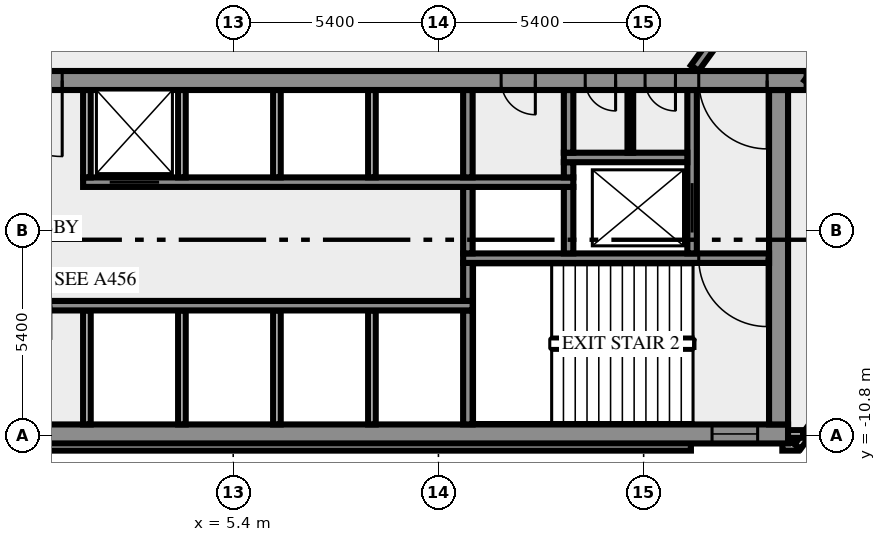
"""IFC4 building model, lengths in metres.
Left out: names, types, materials, properties, quantities, classifications, styles, units other than length and angle.
Written with IfcOpenShell. Run it as: python <this file> out.ifc"""

import sys

from ifc_helpers import new_model, si_unit, direction, frame, frame_2d, origin, place, context, subcontext, project, spatial, rectangle, extrude, element, fill, save


model = new_model("IFC4")
c1 = context("Model", 3, precision=1e-05, world=origin(), true_north=direction((0.0, 1.0)))
c2 = subcontext(c1, "Body", "Model", "MODEL_VIEW")
j1 = project(units=[si_unit("LENGTHUNIT", "METRE"), si_unit("PLANEANGLEUNIT", "RADIAN")], contexts=[c1])
p1 = place(None, origin())
s1 = spatial("IfcSite", under=j1, at=p1, CompositionType="ELEMENT")
p2 = place(p1, origin())
s2 = spatial("IfcBuilding", under=s1, at=p2, CompositionType="ELEMENT")
p3 = place(p2, frame((0.0, 0.0, 51.0)))
s3 = spatial("IfcBuildingStorey", under=s2, at=p3, CompositionType="ELEMENT", Elevation=51.0)
p4 = place(p3, frame((-17.444, -11.088, 0.0), z_axis=(0.0, 0.0, 1.0), x_axis=(1.0, 0.0, 0.0)))
e1 = element("IfcWall", 1, at=p4, inside=s3, PredefinedType="SOLIDWALL", context=c2, shape_type="SweptSolid", body=[
    extrude(rectangle(XDim=34.888, YDim=0.2, at=frame_2d((17.444, 0.0))), origin(), (0.0, 0.0, 1.0), 3.65),
])
p5 = place(p3, frame((19.85, -11.088, 0.0), z_axis=(0.0, 0.0, 1.0), x_axis=(1.0, 0.0, 0.0)))
e2 = element("IfcWall", 2, at=p5, inside=s3, PredefinedType="SOLIDWALL", context=c2, shape_type="SweptSolid", body=[
    extrude(rectangle(XDim=0.406, YDim=0.2, at=frame_2d((0.203, 0.0))), origin(), (0.0, 0.0, 1.0), 3.65),
])
p6 = place(p3, frame((20.253, -11.083, 0.0), z_axis=(0.0, 0.0, 1.0), x_axis=(0.587766567315, 0.809030569476, 0.0)))
e3 = element("IfcWall", 3, at=p6, inside=s3, PredefinedType="SOLIDWALL", context=c2, shape_type="SweptSolid", body=[
    extrude(rectangle(XDim=2.688, YDim=0.2, at=frame_2d((1.344, 0.0))), origin(), (0.0, 0.0, 1.0), 3.65),
])
p7 = place(p3, frame((19.98, -10.75, 0.0), z_axis=(0.0, 0.0, 1.0), x_axis=(1.0, 0.0, 0.0)))
e4 = element("IfcWall", 4, at=p7, inside=s3, PredefinedType="SOLIDWALL", context=c2, shape_type="SweptSolid", body=[
    extrude(rectangle(XDim=0.417, YDim=0.2, at=frame_2d((0.208, 0.0))), origin(), (0.0, 0.0, 1.0), 3.65),
])
p8 = place(p3, frame((-20.0, -10.75, 0.0), z_axis=(0.0, 0.0, 1.0), x_axis=(1.0, 0.0, 0.0)))
e5 = element("IfcWall", 5, at=p8, inside=s3, PredefinedType="SHEAR", context=c2, shape_type="SweptSolid", body=[
    extrude(rectangle(XDim=40.0, YDim=0.5, at=frame_2d((20.0, 0.0))), origin(), (0.0, 0.0, 1.0), 3.65),
])
p9 = place(p8, frame((0.8, 0.0, 1.0)))
e6 = element("IfcOpeningElement", 6, at=p9, cuts=e5, PredefinedType="OPENING", context=c2, shape_type="SweptSolid", body=[
    extrude(rectangle(XDim=1.2, YDim=1.2, at=frame_2d((0.6, 0.6))), frame((0.0, 0.26, 0.0), z_axis=(0.0, -1.0, 0.0), x_axis=(1.0, 0.0, 0.0)), (0.0, 0.0, 1.0), 0.52),
])
p10 = place(p8, frame((38.0, 0.0, 1.0)))
e7 = element("IfcOpeningElement", 7, at=p10, cuts=e5, PredefinedType="OPENING", context=c2, shape_type="SweptSolid", body=[
    extrude(rectangle(XDim=1.2, YDim=1.2, at=frame_2d((0.6, 0.6))), frame((0.0, 0.26, 0.0), z_axis=(0.0, -1.0, 0.0), x_axis=(1.0, 0.0, 0.0)), (0.0, 0.0, 1.0), 0.52),
])
for number, where, z_axis, x_axis in (
    (8, (1.55, -10.5, 0.0), (0.0, 0.0, 1.0), (0.0, 1.0, 0.0)),
    (9, (4.05, -10.5, 0.0), (0.0, 0.0, 1.0), (0.0, 1.0, 0.0)),
    (10, (6.55, -10.5, 0.0), (0.0, 0.0, 1.0), (0.0, 1.0, 0.0)),
    (11, (9.05, -10.5, 0.0), (0.0, 0.0, 1.0), (0.0, 1.0, 0.0)),
):
    element("IfcWall", number, at=place(p3, frame(where, z_axis=z_axis, x_axis=x_axis)), inside=s3, PredefinedType="SOLIDWALL", context=c2, shape_type="SweptSolid", body=[
        extrude(rectangle(XDim=3.0, YDim=0.2, at=frame_2d((1.5, 0.0))), origin(), (0.0, 0.0, 1.0), 3.65),
    ])
p11 = place(p3, frame((11.575, -10.5, 0.0), z_axis=(0.0, 0.0, 1.0), x_axis=(0.0, 1.0, 0.0)))
e12 = element("IfcWall", 12, at=p11, inside=s3, PredefinedType="SHEAR", context=c2, shape_type="SweptSolid", body=[
    extrude(rectangle(XDim=3.0, YDim=0.25, at=frame_2d((1.5, 0.0))), origin(), (0.0, 0.0, 1.0), 3.65),
])
p12 = place(p3, frame((19.75, -10.5, 0.0), z_axis=(0.0, 0.0, 1.0), x_axis=(0.0, 1.0, 0.0)))
e13 = element("IfcWall", 13, at=p12, inside=s3, PredefinedType="SHEAR", context=c2, shape_type="SweptSolid", body=[
    extrude(rectangle(XDim=8.8, YDim=0.5, at=frame_2d((4.4, 0.0))), origin(), (0.0, 0.0, 1.0), 3.65),
])
p13 = place(p3, frame((11.7, -7.375, 0.0), z_axis=(0.0, 0.0, 1.0), x_axis=(-1.0, 0.0, 0.0)))
e14 = element("IfcWall", 14, at=p13, inside=s3, PredefinedType="SHEAR", context=c2, shape_type="SweptSolid", body=[
    extrude(rectangle(XDim=23.4, YDim=0.25, at=frame_2d((11.7, 0.0))), origin(), (0.0, 0.0, 1.0), 3.65),
])
p14 = place(p13, frame((21.45, 0.0, 0.0)))
e15 = element("IfcOpeningElement", 15, at=p14, cuts=e14, PredefinedType="OPENING", context=c2, shape_type="SweptSolid", body=[
    extrude(rectangle(XDim=1.1, YDim=2.1, at=frame_2d((0.55, 1.05))), frame((0.0, 0.135, 0.0), z_axis=(0.0, -1.0, 0.0), x_axis=(1.0, 0.0, 0.0)), (0.0, 0.0, 1.0), 0.27),
])
p15 = place(p13, frame((18.95, 0.0, 0.0)))
e16 = element("IfcOpeningElement", 16, at=p15, cuts=e14, PredefinedType="OPENING", context=c2, shape_type="SweptSolid", body=[
    extrude(rectangle(XDim=1.1, YDim=2.1, at=frame_2d((0.55, 1.05))), frame((0.0, 0.135, 0.0), z_axis=(0.0, -1.0, 0.0), x_axis=(1.0, 0.0, 0.0)), (0.0, 0.0, 1.0), 0.27),
])
p16 = place(p13, frame((16.45, 0.0, 0.0)))
e17 = element("IfcOpeningElement", 17, at=p16, cuts=e14, PredefinedType="OPENING", context=c2, shape_type="SweptSolid", body=[
    extrude(rectangle(XDim=1.1, YDim=2.1, at=frame_2d((0.55, 1.05))), frame((0.0, 0.135, 0.0), z_axis=(0.0, -1.0, 0.0), x_axis=(1.0, 0.0, 0.0)), (0.0, 0.0, 1.0), 0.27),
])
p17 = place(p13, frame((13.875, 0.0, 0.0)))
e18 = element("IfcOpeningElement", 18, at=p17, cuts=e14, PredefinedType="OPENING", context=c2, shape_type="SweptSolid", body=[
    extrude(rectangle(XDim=0.9, YDim=2.1, at=frame_2d((0.45, 1.05))), frame((0.0, 0.135, 0.0), z_axis=(0.0, -1.0, 0.0), x_axis=(1.0, 0.0, 0.0)), (0.0, 0.0, 1.0), 0.27),
])
p18 = place(p13, frame((11.1, 0.0, 0.0)))
e19 = element("IfcOpeningElement", 19, at=p18, cuts=e14, PredefinedType="OPENING", context=c2, shape_type="SweptSolid", body=[
    extrude(rectangle(XDim=0.9, YDim=2.1, at=frame_2d((0.45, 1.05))), frame((0.0, 0.135, 0.0), z_axis=(0.0, -1.0, 0.0), x_axis=(1.0, 0.0, 0.0)), (0.0, 0.0, 1.0), 0.27),
])
p19 = place(p3, frame((11.575, -7.25, 0.0), z_axis=(0.0, 0.0, 1.0), x_axis=(0.0, 1.0, 0.0)))
e20 = element("IfcWall", 20, at=p19, inside=s3, PredefinedType="SHEAR", context=c2, shape_type="SweptSolid", body=[
    extrude(rectangle(XDim=1.0, YDim=0.25, at=frame_2d((0.5, 0.0))), origin(), (0.0, 0.0, 1.0), 3.65),
])
p20 = place(p3, frame((19.5, -6.125, 0.0), z_axis=(0.0, 0.0, 1.0), x_axis=(-1.0, 0.0, 0.0)))
e21 = element("IfcWall", 21, at=p20, inside=s3, PredefinedType="SHEAR", context=c2, shape_type="SweptSolid", body=[
    extrude(rectangle(XDim=8.05, YDim=0.25, at=frame_2d((4.025, 0.0))), origin(), (0.0, 0.0, 1.0), 3.65),
])
p21 = place(p20, frame((0.05, 0.0, 0.0)))
e22 = element("IfcOpeningElement", 22, at=p21, cuts=e21, PredefinedType="OPENING", context=c2, shape_type="SweptSolid", body=[
    extrude(rectangle(XDim=1.8, YDim=2.1, at=frame_2d((0.9, 1.05))), frame((0.0, 0.135, 0.0), z_axis=(0.0, -1.0, 0.0), x_axis=(1.0, 0.0, 0.0)), (0.0, 0.0, 1.0), 0.27),
])
for number, where, z_axis, x_axis in (
    (23, (11.575, -6.0, 0.0), (0.0, 0.0, 1.0), (0.0, 1.0, 0.0)),
    (24, (14.225, -6.0, 0.0), (0.0, 0.0, 1.0), (0.0, 1.0, 0.0)),
):
    element("IfcWall", number, at=place(p3, frame(where, z_axis=z_axis, x_axis=x_axis)), inside=s3, PredefinedType="SHEAR", context=c2, shape_type="SweptSolid", body=[
        extrude(rectangle(XDim=1.75, YDim=0.25, at=frame_2d((0.875, 0.0))), origin(), (0.0, 0.0, 1.0), 3.65),
    ])
p22 = place(p3, frame((17.475, -6.0, 0.0), z_axis=(0.0, 0.0, 1.0), x_axis=(0.0, 1.0, 0.0)))
e25 = element("IfcWall", 25, at=p22, inside=s3, PredefinedType="SHEAR", context=c2, shape_type="SweptSolid", body=[
    extrude(rectangle(XDim=4.3, YDim=0.25, at=frame_2d((2.15, 0.0))), origin(), (0.0, 0.0, 1.0), 3.65),
])
p23 = place(p22, frame((0.55, 0.0, 0.0)))
e26 = element("IfcOpeningElement", 26, at=p23, cuts=e25, PredefinedType="OPENING", context=c2, shape_type="SweptSolid", body=[
    extrude(rectangle(XDim=1.3, YDim=2.1, at=frame_2d((0.65, 1.05))), frame((0.0, 0.135, 0.0), z_axis=(0.0, -1.0, 0.0), x_axis=(1.0, 0.0, 0.0)), (0.0, 0.0, 1.0), 0.27),
])
p24 = place(p3, frame((1.45, -4.125, 0.0), z_axis=(0.0, 0.0, 1.0), x_axis=(1.0, 0.0, 0.0)))
e27 = element("IfcWall", 27, at=p24, inside=s3, PredefinedType="SHEAR", context=c2, shape_type="SweptSolid", body=[
    extrude(rectangle(XDim=12.9, YDim=0.25, at=frame_2d((6.45, 0.0))), origin(), (0.0, 0.0, 1.0), 3.65),
])
p25 = place(p24, frame((0.7, 0.0, 0.0)))
e28 = element("IfcOpeningElement", 28, at=p25, cuts=e27, PredefinedType="OPENING", context=c2, shape_type="SweptSolid", body=[
    extrude(rectangle(XDim=1.3, YDim=2.1, at=frame_2d((0.65, 1.05))), frame((0.0, 0.135, 0.0), z_axis=(0.0, -1.0, 0.0), x_axis=(1.0, 0.0, 0.0)), (0.0, 0.0, 1.0), 0.27),
])
for number, where, z_axis, x_axis in (
    (29, (1.55, -4.0, 0.0), (0.0, 0.0, 1.0), (0.0, 1.0, 0.0)),
    (30, (4.05, -4.0, 0.0), (0.0, 0.0, 1.0), (0.0, 1.0, 0.0)),
    (31, (6.55, -4.0, 0.0), (0.0, 0.0, 1.0), (0.0, 1.0, 0.0)),
    (32, (9.05, -4.0, 0.0), (0.0, 0.0, 1.0), (0.0, 1.0, 0.0)),
):
    element("IfcWall", number, at=place(p3, frame(where, z_axis=z_axis, x_axis=x_axis)), inside=s3, PredefinedType="SOLIDWALL", context=c2, shape_type="SweptSolid", body=[
        extrude(rectangle(XDim=2.3, YDim=0.2, at=frame_2d((1.15, 0.0))), origin(), (0.0, 0.0, 1.0), 3.65),
    ])
p26 = place(p3, frame((11.575, -4.0, 0.0), z_axis=(0.0, 0.0, 1.0), x_axis=(0.0, 1.0, 0.0)))
e33 = element("IfcWall", 33, at=p26, inside=s3, PredefinedType="SHEAR", context=c2, shape_type="SweptSolid", body=[
    extrude(rectangle(XDim=2.3, YDim=0.25, at=frame_2d((1.15, 0.0))), origin(), (0.0, 0.0, 1.0), 3.65),
])
p27 = place(p3, frame((14.225, -4.0, 0.0), z_axis=(0.0, 0.0, 1.0), x_axis=(0.0, 1.0, 0.0)))
e34 = element("IfcWall", 34, at=p27, inside=s3, PredefinedType="SHEAR", context=c2, shape_type="SweptSolid", body=[
    extrude(rectangle(XDim=0.4, YDim=0.25, at=frame_2d((0.2, 0.0))), origin(), (0.0, 0.0, 1.0), 3.65),
])
p28 = place(p3, frame((14.1, -3.475, 0.0), z_axis=(0.0, 0.0, 1.0), x_axis=(1.0, 0.0, 0.0)))
e35 = element("IfcWall", 35, at=p28, inside=s3, PredefinedType="SHEAR", context=c2, shape_type="SweptSolid", body=[
    extrude(rectangle(XDim=3.25, YDim=0.25, at=frame_2d((1.625, 0.0))), origin(), (0.0, 0.0, 1.0), 3.65),
])
p29 = place(p3, frame((14.225, -3.35, 0.0), z_axis=(0.0, 0.0, 1.0), x_axis=(0.0, 1.0, 0.0)))
e36 = element("IfcWall", 36, at=p29, inside=s3, PredefinedType="SHEAR", context=c2, shape_type="SweptSolid", body=[
    extrude(rectangle(XDim=1.65, YDim=0.25, at=frame_2d((0.825, 0.0))), origin(), (0.0, 0.0, 1.0), 3.65),
])
p30 = place(p3, frame((15.85, -3.35, 0.0), z_axis=(0.0, 0.0, 1.0), x_axis=(0.0, 1.0, 0.0)))
e37 = element("IfcWall", 37, at=p30, inside=s3, PredefinedType="PARTITIONING", context=c2, shape_type="SweptSolid", body=[
    extrude(rectangle(XDim=1.65, YDim=0.15, at=frame_2d((0.825, 0.0))), origin(), (0.0, 0.0, 1.0), 3.65),
])
p31 = place(p3, frame((20.49, -1.45, 0.0), z_axis=(0.0, 0.0, 1.0), x_axis=(-1.0, 0.0, 0.0)))
e38 = element("IfcWall", 38, at=p31, inside=s3, PredefinedType="SHEAR", context=c2, shape_type="SweptSolid", body=[
    extrude(rectangle(XDim=40.98, YDim=0.5, at=frame_2d((20.49, 0.0))), origin(), (0.0, 0.0, 1.0), 3.65),
])
p32 = place(p31, frame((38.14, 0.0, 0.0)))
e39 = element("IfcOpeningElement", 39, at=p32, cuts=e38, PredefinedType="OPENING", context=c2, shape_type="SweptSolid", body=[
    extrude(rectangle(XDim=1.8, YDim=2.1, at=frame_2d((0.9, 1.05))), frame((0.0, 0.26, 0.0), z_axis=(0.0, -1.0, 0.0), x_axis=(1.0, 0.0, 0.0)), (0.0, 0.0, 1.0), 0.52),
])
p33 = place(p31, frame((35.89, 0.0, 0.0)))
e40 = element("IfcOpeningElement", 40, at=p33, cuts=e38, PredefinedType="OPENING", context=c2, shape_type="SweptSolid", body=[
    extrude(rectangle(XDim=0.9, YDim=2.1, at=frame_2d((0.45, 1.05))), frame((0.0, 0.26, 0.0), z_axis=(0.0, -1.0, 0.0), x_axis=(1.0, 0.0, 0.0)), (0.0, 0.0, 1.0), 0.52),
])
p34 = place(p31, frame((32.94, 0.0, 0.0)))
e41 = element("IfcOpeningElement", 41, at=p34, cuts=e38, PredefinedType="OPENING", context=c2, shape_type="SweptSolid", body=[
    extrude(rectangle(XDim=0.9, YDim=2.1, at=frame_2d((0.45, 1.05))), frame((0.0, 0.26, 0.0), z_axis=(0.0, -1.0, 0.0), x_axis=(1.0, 0.0, 0.0)), (0.0, 0.0, 1.0), 0.52),
])
p35 = place(p31, frame((19.59, 0.0, 0.0)))
e42 = element("IfcOpeningElement", 42, at=p35, cuts=e38, PredefinedType="OPENING", context=c2, shape_type="SweptSolid", body=[
    extrude(rectangle(XDim=2.0, YDim=2.1, at=frame_2d((1.0, 1.05))), frame((0.0, 0.26, 0.0), z_axis=(0.0, -1.0, 0.0), x_axis=(1.0, 0.0, 0.0)), (0.0, 0.0, 1.0), 0.52),
])
p36 = place(p31, frame((7.14, 0.0, 0.0)))
e43 = element("IfcOpeningElement", 43, at=p36, cuts=e38, PredefinedType="OPENING", context=c2, shape_type="SweptSolid", body=[
    extrude(rectangle(XDim=0.9, YDim=2.1, at=frame_2d((0.45, 1.05))), frame((0.0, 0.26, 0.0), z_axis=(0.0, -1.0, 0.0), x_axis=(1.0, 0.0, 0.0)), (0.0, 0.0, 1.0), 0.52),
])
p37 = place(p31, frame((5.028, 0.0, 0.0)))
e44 = element("IfcOpeningElement", 44, at=p37, cuts=e38, PredefinedType="OPENING", context=c2, shape_type="SweptSolid", body=[
    extrude(rectangle(XDim=0.8, YDim=2.1, at=frame_2d((0.4, 1.05))), frame((0.0, 0.26, 0.0), z_axis=(0.0, -1.0, 0.0), x_axis=(1.0, 0.0, 0.0)), (0.0, 0.0, 1.0), 0.52),
])
p38 = place(p31, frame((3.452, 0.0, 0.0)))
e45 = element("IfcOpeningElement", 45, at=p38, cuts=e38, PredefinedType="OPENING", context=c2, shape_type="SweptSolid", body=[
    extrude(rectangle(XDim=0.8, YDim=2.1, at=frame_2d((0.4, 1.05))), frame((0.0, 0.26, 0.0), z_axis=(0.0, -1.0, 0.0), x_axis=(1.0, 0.0, 0.0)), (0.0, 0.0, 1.0), 0.52),
])
p39 = place(p31, frame((1.04, 0.0, 0.0)))
e46 = element("IfcOpeningElement", 46, at=p39, cuts=e38, PredefinedType="OPENING", context=c2, shape_type="SweptSolid", body=[
    extrude(rectangle(XDim=1.8, YDim=2.1, at=frame_2d((0.9, 1.05))), frame((0.0, 0.26, 0.0), z_axis=(0.0, -1.0, 0.0), x_axis=(1.0, 0.0, 0.0)), (0.0, 0.0, 1.0), 0.52),
])
p40 = place(p3, frame((17.545, -1.125, 0.0), z_axis=(0.0, 0.0, 1.0), x_axis=(0.587786323093, 0.809016216391, 0.0)))
e47 = element("IfcWall", 47, at=p40, inside=s3, PredefinedType="SOLIDWALL", context=c2, shape_type="SweptSolid", body=[
    extrude(rectangle(XDim=33.493, YDim=0.25, at=frame_2d((16.747, 0.0))), origin(), (0.0, 0.0, 1.0), 3.65),
])
p41 = place(p40, frame((16.158, 0.0, 0.0)))
e48 = element("IfcOpeningElement", 48, at=p41, cuts=e47, PredefinedType="OPENING", context=c2, shape_type="SweptSolid", body=[
    extrude(rectangle(XDim=0.9, YDim=2.1, at=frame_2d((0.45, 1.05))), frame((0.0, 0.135, 0.0), z_axis=(0.0, -1.0, 0.0), x_axis=(1.0, 0.0, 0.0)), (0.0, 0.0, 1.0), 0.27),
])
p42 = place(p40, frame((32.253, 0.0, 0.0)))
e49 = element("IfcOpeningElement", 49, at=p42, cuts=e47, PredefinedType="OPENING", context=c2, shape_type="SweptSolid", body=[
    extrude(rectangle(XDim=0.9, YDim=2.1, at=frame_2d((0.45, 1.05))), frame((0.0, 0.135, 0.0), z_axis=(0.0, -1.0, 0.0), x_axis=(1.0, 0.0, 0.0)), (0.0, 0.0, 1.0), 0.27),
])
p43 = place(p40, frame((17.757, 0.0, 0.0)))
e50 = element("IfcOpeningElement", 50, at=p43, cuts=e47, PredefinedType="OPENING", context=c2, shape_type="SweptSolid", body=[
    extrude(rectangle(XDim=1.2, YDim=2.1, at=frame_2d((0.6, 1.05))), frame((0.0, 0.135, 0.0), z_axis=(0.0, -1.0, 0.0), x_axis=(1.0, 0.0, 0.0)), (0.0, 0.0, 1.0), 0.27),
])
p44 = place(p3, frame((46.641, 34.413, 0.0), z_axis=(0.0, 0.0, 1.0), x_axis=(-0.587785682186, -0.809016682039, 0.0)))
e51 = element("IfcWall", 51, at=p44, inside=s3, PredefinedType="SOLIDWALL", context=c2, shape_type="SweptSolid", body=[
    extrude(rectangle(XDim=44.42, YDim=0.25, at=frame_2d((22.21, 0.0))), origin(), (0.0, 0.0, 1.0), 3.65),
])
p45 = place(p44, frame((12.755, 0.0, 0.0)))
e52 = element("IfcOpeningElement", 52, at=p45, cuts=e51, PredefinedType="OPENING", context=c2, shape_type="SweptSolid", body=[
    extrude(rectangle(XDim=0.9, YDim=2.1, at=frame_2d((0.45, 1.05))), frame((0.0, 0.135, 0.0), z_axis=(0.0, -1.0, 0.0), x_axis=(1.0, 0.0, 0.0)), (0.0, 0.0, 1.0), 0.27),
])
p46 = place(p44, frame((29.205, 0.0, 0.0)))
e53 = element("IfcOpeningElement", 53, at=p46, cuts=e51, PredefinedType="OPENING", context=c2, shape_type="SweptSolid", body=[
    extrude(rectangle(XDim=0.9, YDim=2.1, at=frame_2d((0.45, 1.05))), frame((0.0, 0.135, 0.0), z_axis=(0.0, -1.0, 0.0), x_axis=(1.0, 0.0, 0.0)), (0.0, 0.0, 1.0), 0.27),
])
p47 = place(p44, frame((14.354, 0.0, 0.0)))
e54 = element("IfcOpeningElement", 54, at=p47, cuts=e51, PredefinedType="OPENING", context=c2, shape_type="SweptSolid", body=[
    extrude(rectangle(XDim=0.9, YDim=2.1, at=frame_2d((0.45, 1.05))), frame((0.0, 0.135, 0.0), z_axis=(0.0, -1.0, 0.0), x_axis=(1.0, 0.0, 0.0)), (0.0, 0.0, 1.0), 0.27),
])
p48 = place(p44, frame((27.604, 0.0, 0.0)))
e55 = element("IfcOpeningElement", 55, at=p48, cuts=e51, PredefinedType="OPENING", context=c2, shape_type="SweptSolid", body=[
    extrude(rectangle(XDim=0.9, YDim=2.1, at=frame_2d((0.45, 1.05))), frame((0.0, 0.135, 0.0), z_axis=(0.0, -1.0, 0.0), x_axis=(1.0, 0.0, 0.0)), (0.0, 0.0, 1.0), 0.27),
])
p49 = place(p44, frame((0.225, 0.0, 0.0)))
e56 = element("IfcOpeningElement", 56, at=p49, cuts=e51, PredefinedType="OPENING", context=c2, shape_type="SweptSolid", body=[
    extrude(rectangle(XDim=0.9, YDim=2.1, at=frame_2d((0.45, 1.05))), frame((0.0, 0.135, 0.0), z_axis=(0.0, -1.0, 0.0), x_axis=(1.0, 0.0, 0.0)), (0.0, 0.0, 1.0), 0.27),
])
p50 = place(p10, origin())
e57 = element("IfcWindow", 57, at=p50, inside=s3, PartitioningType="SINGLE_PANEL", PredefinedType="WINDOW", context=c2, shape_type="SweptSolid", body=[
    extrude(rectangle(XDim=1.2, YDim=1.2, at=frame_2d((0.6, 0.6))), frame((0.0, 0.03, 0.0), z_axis=(0.0, -1.0, 0.0), x_axis=(1.0, 0.0, 0.0)), (0.0, 0.0, 1.0), 0.06),
])
fill(e7, e57)
p51 = place(p21, origin())
e58 = element("IfcDoor", 58, at=p51, inside=s3, OperationType="DOUBLE_DOOR_SINGLE_SWING", PredefinedType="DOOR", context=c2, shape_type="SweptSolid", body=[
    extrude(rectangle(XDim=1.8, YDim=2.1, at=frame_2d((0.9, 1.05))), frame((0.0, 0.025, 0.0), z_axis=(0.0, -1.0, 0.0), x_axis=(1.0, 0.0, 0.0)), (0.0, 0.0, 1.0), 0.05),
])
fill(e22, e58)
p52 = place(p23, origin())
e59 = element("IfcDoor", 59, at=p52, inside=s3, OperationType="DOUBLE_DOOR_SLIDING", PredefinedType="DOOR", context=c2, shape_type="SweptSolid", body=[
    extrude(rectangle(XDim=1.3, YDim=2.1, at=frame_2d((0.65, 1.05))), frame((0.0, 0.025, 0.0), z_axis=(0.0, -1.0, 0.0), x_axis=(1.0, 0.0, 0.0)), (0.0, 0.0, 1.0), 0.05),
])
fill(e26, e59)
p53 = place(p25, origin())
e60 = element("IfcDoor", 60, at=p53, inside=s3, OperationType="DOUBLE_DOOR_SLIDING", PredefinedType="DOOR", context=c2, shape_type="SweptSolid", body=[
    extrude(rectangle(XDim=1.3, YDim=2.1, at=frame_2d((0.65, 1.05))), frame((0.0, 0.025, 0.0), z_axis=(0.0, -1.0, 0.0), x_axis=(1.0, 0.0, 0.0)), (0.0, 0.0, 1.0), 0.05),
])
fill(e28, e60)
p54 = place(p35, origin())
e61 = element("IfcDoor", 61, at=p54, inside=s3, OperationType="DOUBLE_DOOR_SINGLE_SWING", PredefinedType="DOOR", context=c2, shape_type="SweptSolid", body=[
    extrude(rectangle(XDim=2.0, YDim=2.1, at=frame_2d((1.0, 1.05))), frame((0.0, 0.025, 0.0), z_axis=(0.0, -1.0, 0.0), x_axis=(1.0, 0.0, 0.0)), (0.0, 0.0, 1.0), 0.05),
])
fill(e42, e61)
p55 = place(p36, origin())
e62 = element("IfcDoor", 62, at=p55, inside=s3, OperationType="SINGLE_SWING_LEFT", PredefinedType="DOOR", context=c2, shape_type="SweptSolid", body=[
    extrude(rectangle(XDim=0.9, YDim=2.1, at=frame_2d((0.45, 1.05))), frame((0.0, 0.025, 0.0), z_axis=(0.0, -1.0, 0.0), x_axis=(1.0, 0.0, 0.0)), (0.0, 0.0, 1.0), 0.05),
])
fill(e43, e62)
p56 = place(p37, origin())
e63 = element("IfcDoor", 63, at=p56, inside=s3, OperationType="SINGLE_SWING_LEFT", PredefinedType="DOOR", context=c2, shape_type="SweptSolid", body=[
    extrude(rectangle(XDim=0.8, YDim=2.1, at=frame_2d((0.4, 1.05))), frame((0.0, 0.025, 0.0), z_axis=(0.0, -1.0, 0.0), x_axis=(1.0, 0.0, 0.0)), (0.0, 0.0, 1.0), 0.05),
])
fill(e44, e63)
p57 = place(p38, origin())
e64 = element("IfcDoor", 64, at=p57, inside=s3, OperationType="SINGLE_SWING_LEFT", PredefinedType="DOOR", context=c2, shape_type="SweptSolid", body=[
    extrude(rectangle(XDim=0.8, YDim=2.1, at=frame_2d((0.4, 1.05))), frame((0.0, 0.025, 0.0), z_axis=(0.0, -1.0, 0.0), x_axis=(1.0, 0.0, 0.0)), (0.0, 0.0, 1.0), 0.05),
])
fill(e45, e64)
p58 = place(p39, origin())
e65 = element("IfcDoor", 65, at=p58, inside=s3, OperationType="DOUBLE_DOOR_SINGLE_SWING", PredefinedType="DOOR", context=c2, shape_type="SweptSolid", body=[
    extrude(rectangle(XDim=1.8, YDim=2.1, at=frame_2d((0.9, 1.05))), frame((0.0, 0.025, 0.0), z_axis=(0.0, -1.0, 0.0), x_axis=(1.0, 0.0, 0.0)), (0.0, 0.0, 1.0), 0.05),
])
fill(e46, e65)
save(model, sys.argv[1])
